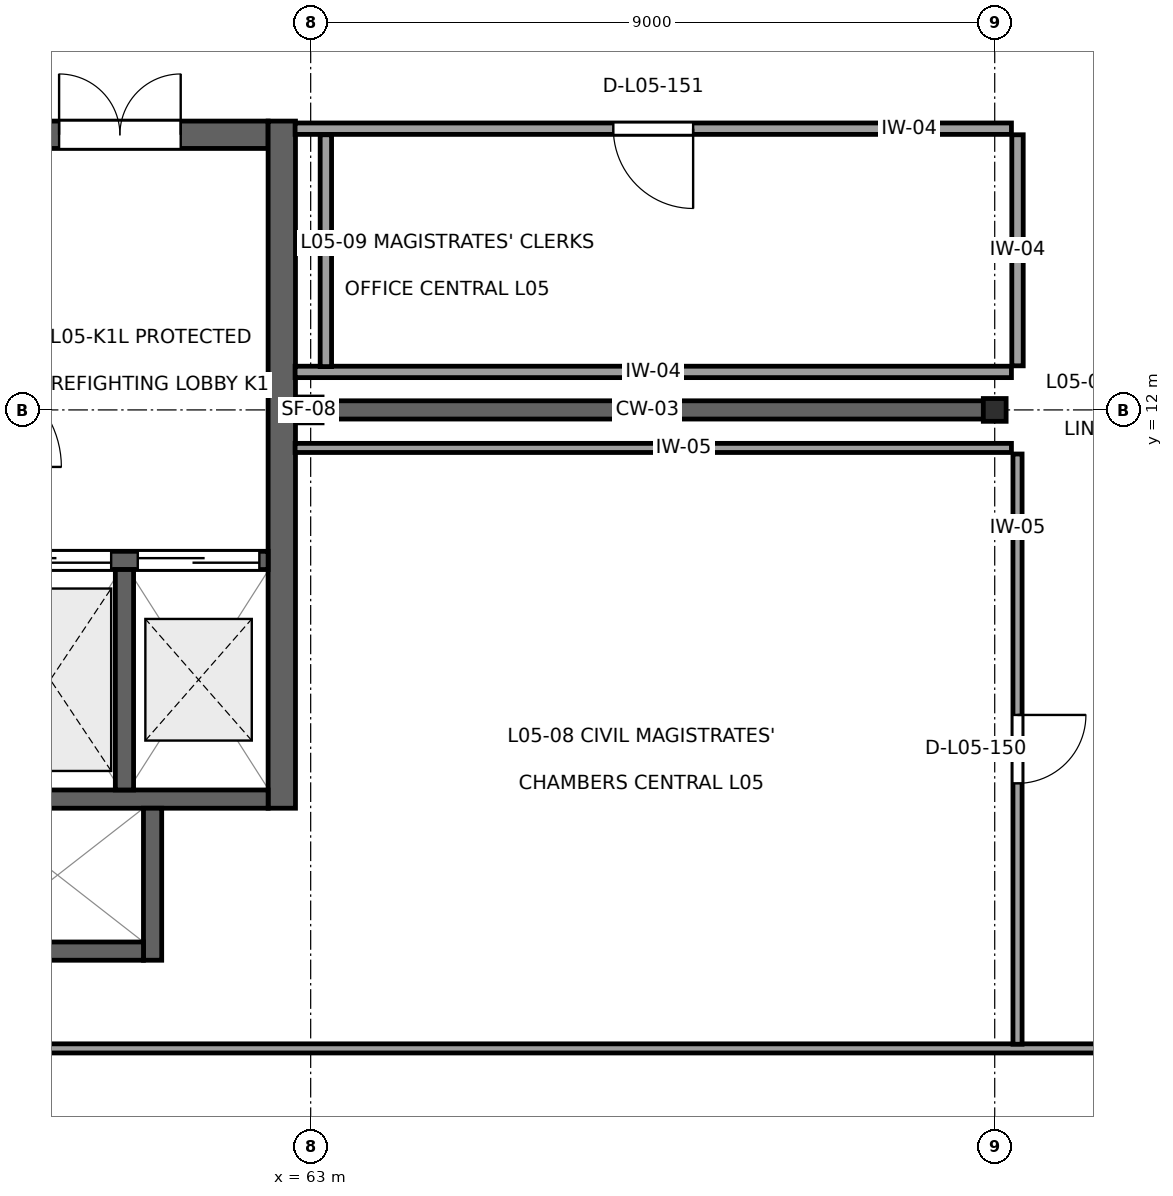
"""IFC4 building model, lengths in metres.
Left out: names, types, materials, properties, quantities, classifications, styles, units other than length and angle.
Written with IfcOpenShell. Run it as: python <this file> out.ifc"""

import sys

from ifc_helpers import new_model, si_unit, direction, frame, frame_2d, origin, origin_2d, place, context, subcontext, project, spatial, rectangle, i_section, extrude, element, fill, save


model = new_model("IFC4")
c1 = context("Model", 3, precision=1e-05, world=origin(), true_north=direction((0.0, 1.0)))
c2 = subcontext(c1, "Body", "Model", "MODEL_VIEW")
j1 = project(units=[si_unit("LENGTHUNIT", "METRE"), si_unit("PLANEANGLEUNIT", "RADIAN")], contexts=[c1])
p1 = place(None, origin())
s1 = spatial("IfcSite", under=j1, at=p1, CompositionType="ELEMENT")
p2 = place(p1, origin())
s2 = spatial("IfcBuilding", under=s1, at=p2, CompositionType="ELEMENT")
p3 = place(p2, frame((0.0, 0.0, 23.4)))
s3 = spatial("IfcBuildingStorey", under=s2, at=p3, CompositionType="ELEMENT", Elevation=23.4)
p4 = place(p3, frame((63.0, 12.0, 0.0), z_axis=(0.0, 0.0, 1.0), x_axis=(1.0, 0.0, 0.0)))
e1 = element("IfcColumn", 1, at=p4, inside=s3, PredefinedType="COLUMN", context=c2, shape_type="SweptSolid", body=[
    extrude(i_section(OverallWidth=0.3, OverallDepth=0.34, WebThickness=0.012, FlangeThickness=0.021, at=origin_2d()), origin(), (0.0, 0.0, 1.0), 4.0),
])
p5 = place(p3, frame((72.0, 12.0, 0.0), z_axis=(0.0, 0.0, 1.0), x_axis=(0.0, 1.0, 0.0)))
e2 = element("IfcColumn", 2, at=p5, inside=s3, PredefinedType="COLUMN", context=c2, shape_type="SweptSolid", body=[
    extrude(i_section(OverallWidth=0.3, OverallDepth=0.3, WebThickness=0.011, FlangeThickness=0.019, at=origin_2d()), origin(), (0.0, 0.0, 1.0), 4.0),
])
p6 = place(p3, frame((58.54, 15.62, 0.0), z_axis=(0.0, 0.0, 1.0), x_axis=(1.0, 0.0, 0.0)))
e3 = element("IfcWall", 3, at=p6, inside=s3, PredefinedType="SHEAR", context=c2, shape_type="SweptSolid", body=[
    extrude(rectangle(XDim=3.9, YDim=0.36, at=frame_2d((1.95, 0.0))), origin(), (0.0, 0.0, 1.0), 3.66),
])
p7 = place(p6, frame((1.15, 0.0, 0.0)))
e4 = element("IfcOpeningElement", 4, at=p7, cuts=e3, PredefinedType="OPENING", context=c2, shape_type="SweptSolid", body=[
    extrude(rectangle(XDim=1.6, YDim=2.25, at=frame_2d((0.8, 1.125))), frame((0.0, 0.195, 0.0), z_axis=(0.0, -1.0, 0.0), x_axis=(1.0, 0.0, 0.0)), (0.0, 0.0, 1.0), 0.39),
])
p8 = place(p3, frame((62.62, 6.76, 0.0), z_axis=(0.0, 0.0, 1.0), x_axis=(0.0, 1.0, 0.0)))
e5 = element("IfcWall", 5, at=p8, inside=s3, PredefinedType="SHEAR", context=c2, shape_type="SweptSolid", body=[
    extrude(rectangle(XDim=9.04, YDim=0.36, at=frame_2d((4.52, 0.0))), origin(), (0.0, 0.0, 1.0), 3.66),
])
p9 = place(p3, frame((58.54, 10.02, 0.0), z_axis=(0.0, 0.0, 1.0), x_axis=(1.0, 0.0, 0.0)))
e6 = element("IfcWall", 6, at=p9, inside=s3, PredefinedType="SHEAR", context=c2, shape_type="SweptSolid", body=[
    extrude(rectangle(XDim=3.9, YDim=0.24, at=frame_2d((1.95, 0.0))), origin(), (0.0, 0.0, 1.0), 3.81),
])
p10 = place(p9, frame((0.235, 0.0, 0.0)))
e7 = element("IfcOpeningElement", 7, at=p10, cuts=e6, PredefinedType="OPENING", context=c2, shape_type="SweptSolid", body=[
    extrude(rectangle(XDim=1.6, YDim=2.3, at=frame_2d((0.8, 1.15))), frame((0.0, 0.135, 0.0), z_axis=(0.0, -1.0, 0.0), x_axis=(1.0, 0.0, 0.0)), (0.0, 0.0, 1.0), 0.27),
])
p11 = place(p9, frame((2.185, 0.0, 0.0)))
e8 = element("IfcOpeningElement", 8, at=p11, cuts=e6, PredefinedType="OPENING", context=c2, shape_type="SweptSolid", body=[
    extrude(rectangle(XDim=1.6, YDim=2.3, at=frame_2d((0.8, 1.15))), frame((0.0, 0.135, 0.0), z_axis=(0.0, -1.0, 0.0), x_axis=(1.0, 0.0, 0.0)), (0.0, 0.0, 1.0), 0.27),
])
p12 = place(p3, frame((58.54, 6.88, 0.0), z_axis=(0.0, 0.0, 1.0), x_axis=(1.0, 0.0, 0.0)))
e9 = element("IfcWall", 9, at=p12, inside=s3, PredefinedType="SHEAR", context=c2, shape_type="SweptSolid", body=[
    extrude(rectangle(XDim=3.9, YDim=0.24, at=frame_2d((1.95, 0.0))), origin(), (0.0, 0.0, 1.0), 3.81),
])
p13 = place(p3, frame((60.55, 7.0, 0.0), z_axis=(0.0, 0.0, 1.0), x_axis=(0.0, 1.0, 0.0)))
e10 = element("IfcWall", 10, at=p13, inside=s3, PredefinedType="SHEAR", context=c2, shape_type="SweptSolid", body=[
    extrude(rectangle(XDim=2.9, YDim=0.24, at=frame_2d((1.45, 0.0))), origin(), (0.0, 0.0, 1.0), 3.81),
])
p14 = place(p3, frame((60.92, 4.76, 0.0), z_axis=(0.0, 0.0, 1.0), x_axis=(0.0, 1.0, 0.0)))
e11 = element("IfcWall", 11, at=p14, inside=s3, PredefinedType="SHEAR", context=c2, shape_type="SweptSolid", body=[
    extrude(rectangle(XDim=2.0, YDim=0.24, at=frame_2d((1.0, 0.0))), origin(), (0.0, 0.0, 1.0), 3.81),
])
p15 = place(p3, frame((58.54, 4.88, 0.0), z_axis=(0.0, 0.0, 1.0), x_axis=(1.0, 0.0, 0.0)))
e12 = element("IfcWall", 12, at=p15, inside=s3, PredefinedType="SHEAR", context=c2, shape_type="SweptSolid", body=[
    extrude(rectangle(XDim=2.26, YDim=0.24, at=frame_2d((1.13, 0.0))), origin(), (0.0, 0.0, 1.0), 3.81),
])
p16 = place(p3, frame((63.008, 12.0, 0.0), z_axis=(0.0, 0.0, 1.0), x_axis=(1.0, 0.0, 0.0)))
e13 = element("IfcWall", 13, at=p16, inside=s3, PredefinedType="SHEAR", context=c2, shape_type="SweptSolid", body=[
    extrude(rectangle(XDim=8.844, YDim=0.24, at=frame_2d((4.422, 0.0))), origin(), (0.0, 0.0, 1.0), 2.845),
])
p17 = place(p3, frame((53.87, 3.6, 0.0), z_axis=(0.0, 0.0, 1.0), x_axis=(1.0, 0.0, 0.0)))
e14 = element("IfcWall", 14, at=p17, inside=s3, PredefinedType="PARTITIONING", context=c2, shape_type="SweptSolid", body=[
    extrude(rectangle(XDim=63.25, YDim=0.12, at=frame_2d((31.625, 0.0))), origin(), (0.0, 0.0, 1.0), 3.64),
])
p18 = place(p17, frame((19.855, 0.0, 0.0)))
e15 = element("IfcOpeningElement", 15, at=p18, cuts=e14, PredefinedType="OPENING", context=c2, shape_type="SweptSolid", body=[
    extrude(rectangle(XDim=0.95, YDim=2.15, at=frame_2d((0.475, 1.075))), frame((0.0, 0.075, 0.0), z_axis=(0.0, -1.0, 0.0), x_axis=(1.0, 0.0, 0.0)), (0.0, 0.0, 1.0), 0.15),
])
p19 = place(p3, frame((72.3, 11.42, 0.0), z_axis=(0.0, 0.0, 1.0), x_axis=(0.0, -1.0, 0.0)))
e16 = element("IfcWall", 16, at=p19, inside=s3, PredefinedType="PARTITIONING", context=c2, shape_type="SweptSolid", body=[
    extrude(rectangle(XDim=7.765, YDim=0.12, at=frame_2d((3.882, 0.0))), origin(), (0.0, 0.0, 1.0), 3.64),
])
p20 = place(p19, frame((3.433, 0.0, 0.0)))
e17 = element("IfcOpeningElement", 17, at=p20, cuts=e16, PredefinedType="OPENING", context=c2, shape_type="SweptSolid", body=[
    extrude(rectangle(XDim=0.9, YDim=2.1, at=frame_2d((0.45, 1.05))), frame((0.0, 0.075, 0.0), z_axis=(0.0, -1.0, 0.0), x_axis=(1.0, 0.0, 0.0)), (0.0, 0.0, 1.0), 0.15),
])
p21 = place(p3, frame((62.795, 11.5, 0.0), z_axis=(0.0, 0.0, 1.0), x_axis=(1.0, 0.0, 0.0)))
e18 = element("IfcWall", 18, at=p21, inside=s3, PredefinedType="PARTITIONING", context=c2, shape_type="SweptSolid", body=[
    extrude(rectangle(XDim=9.425, YDim=0.12, at=frame_2d((4.712, 0.0))), origin(), (0.0, 0.0, 1.0), 3.64),
])
p22 = place(p3, frame((72.22, 12.5, 0.0), z_axis=(0.0, 0.0, 1.0), x_axis=(-1.0, 0.0, 0.0)))
e19 = element("IfcWall", 19, at=p22, inside=s3, PredefinedType="PARTITIONING", context=c2, shape_type="SweptSolid", body=[
    extrude(rectangle(XDim=9.425, YDim=0.15, at=frame_2d((4.712, 0.0))), origin(), (0.0, 0.0, 1.0), 3.64),
])
p23 = place(p3, frame((63.2, 12.57, 0.0), z_axis=(0.0, 0.0, 1.0), x_axis=(0.0, 1.0, 0.0)))
e20 = element("IfcWall", 20, at=p23, inside=s3, PredefinedType="PARTITIONING", context=c2, shape_type="SweptSolid", body=[
    extrude(rectangle(XDim=3.05, YDim=0.15, at=frame_2d((1.525, 0.0))), origin(), (0.0, 0.0, 1.0), 3.365),
])
p24 = place(p3, frame((62.795, 15.7, 0.0), z_axis=(0.0, 0.0, 1.0), x_axis=(1.0, 0.0, 0.0)))
e21 = element("IfcWall", 21, at=p24, inside=s3, PredefinedType="PARTITIONING", context=c2, shape_type="SweptSolid", body=[
    extrude(rectangle(XDim=9.425, YDim=0.15, at=frame_2d((4.712, 0.0))), origin(), (0.0, 0.0, 1.0), 3.64),
])
p25 = place(p24, frame((4.187, 0.0, 0.0)))
e22 = element("IfcOpeningElement", 22, at=p25, cuts=e21, PredefinedType="OPENING", context=c2, shape_type="SweptSolid", body=[
    extrude(rectangle(XDim=1.05, YDim=2.25, at=frame_2d((0.525, 1.125))), frame((0.0, 0.09, 0.0), z_axis=(0.0, -1.0, 0.0), x_axis=(1.0, 0.0, 0.0)), (0.0, 0.0, 1.0), 0.18),
])
p26 = place(p3, frame((72.3, 15.62, 0.0), z_axis=(0.0, 0.0, 1.0), x_axis=(0.0, -1.0, 0.0)))
e23 = element("IfcWall", 23, at=p26, inside=s3, PredefinedType="PARTITIONING", context=c2, shape_type="SweptSolid", body=[
    extrude(rectangle(XDim=3.04, YDim=0.15, at=frame_2d((1.52, 0.0))), origin(), (0.0, 0.0, 1.0), 3.64),
])
p27 = place(p7, origin())
e24 = element("IfcDoor", 24, at=p27, inside=s3, OperationType="DOUBLE_DOOR_SINGLE_SWING", PredefinedType="DOOR", context=c2, shape_type="SweptSolid", body=[
    extrude(rectangle(XDim=1.6, YDim=2.25, at=frame_2d((0.8, 1.125))), frame((0.0, 0.025, 0.0), z_axis=(0.0, -1.0, 0.0), x_axis=(1.0, 0.0, 0.0)), (0.0, 0.0, 1.0), 0.05),
])
fill(e4, e24)
p28 = place(p10, origin())
e25 = element("IfcDoor", 25, at=p28, inside=s3, OperationType="DOUBLE_DOOR_SLIDING", PredefinedType="DOOR", context=c2, shape_type="SweptSolid", body=[
    extrude(rectangle(XDim=1.6, YDim=2.3, at=frame_2d((0.8, 1.15))), frame((0.0, 0.025, 0.0), z_axis=(0.0, -1.0, 0.0), x_axis=(1.0, 0.0, 0.0)), (0.0, 0.0, 1.0), 0.05),
])
fill(e7, e25)
p29 = place(p11, origin())
e26 = element("IfcDoor", 26, at=p29, inside=s3, OperationType="DOUBLE_DOOR_SLIDING", PredefinedType="DOOR", context=c2, shape_type="SweptSolid", body=[
    extrude(rectangle(XDim=1.6, YDim=2.3, at=frame_2d((0.8, 1.15))), frame((0.0, 0.025, 0.0), z_axis=(0.0, -1.0, 0.0), x_axis=(1.0, 0.0, 0.0)), (0.0, 0.0, 1.0), 0.05),
])
fill(e8, e26)
p30 = place(p20, origin())
e27 = element("IfcDoor", 27, at=p30, inside=s3, OperationType="SINGLE_SWING_LEFT", PredefinedType="DOOR", context=c2, shape_type="SweptSolid", body=[
    extrude(rectangle(XDim=0.9, YDim=2.1, at=frame_2d((0.45, 1.05))), frame((0.0, 0.025, 0.0), z_axis=(0.0, -1.0, 0.0), x_axis=(1.0, 0.0, 0.0)), (0.0, 0.0, 1.0), 0.05),
])
fill(e17, e27)
p31 = place(p25, frame((1.05, 0.0, 0.0), z_axis=(0.0, 0.0, 1.0), x_axis=(-1.0, 0.0, 0.0)))
e28 = element("IfcDoor", 28, at=p31, inside=s3, OperationType="SINGLE_SWING_RIGHT", PredefinedType="DOOR", context=c2, shape_type="SweptSolid", body=[
    extrude(rectangle(XDim=1.05, YDim=2.25, at=frame_2d((0.525, 1.125))), frame((0.0, 0.025, 0.0), z_axis=(0.0, -1.0, 0.0), x_axis=(1.0, 0.0, 0.0)), (0.0, 0.0, 1.0), 0.05),
])
fill(e22, e28)
save(model, sys.argv[1])
